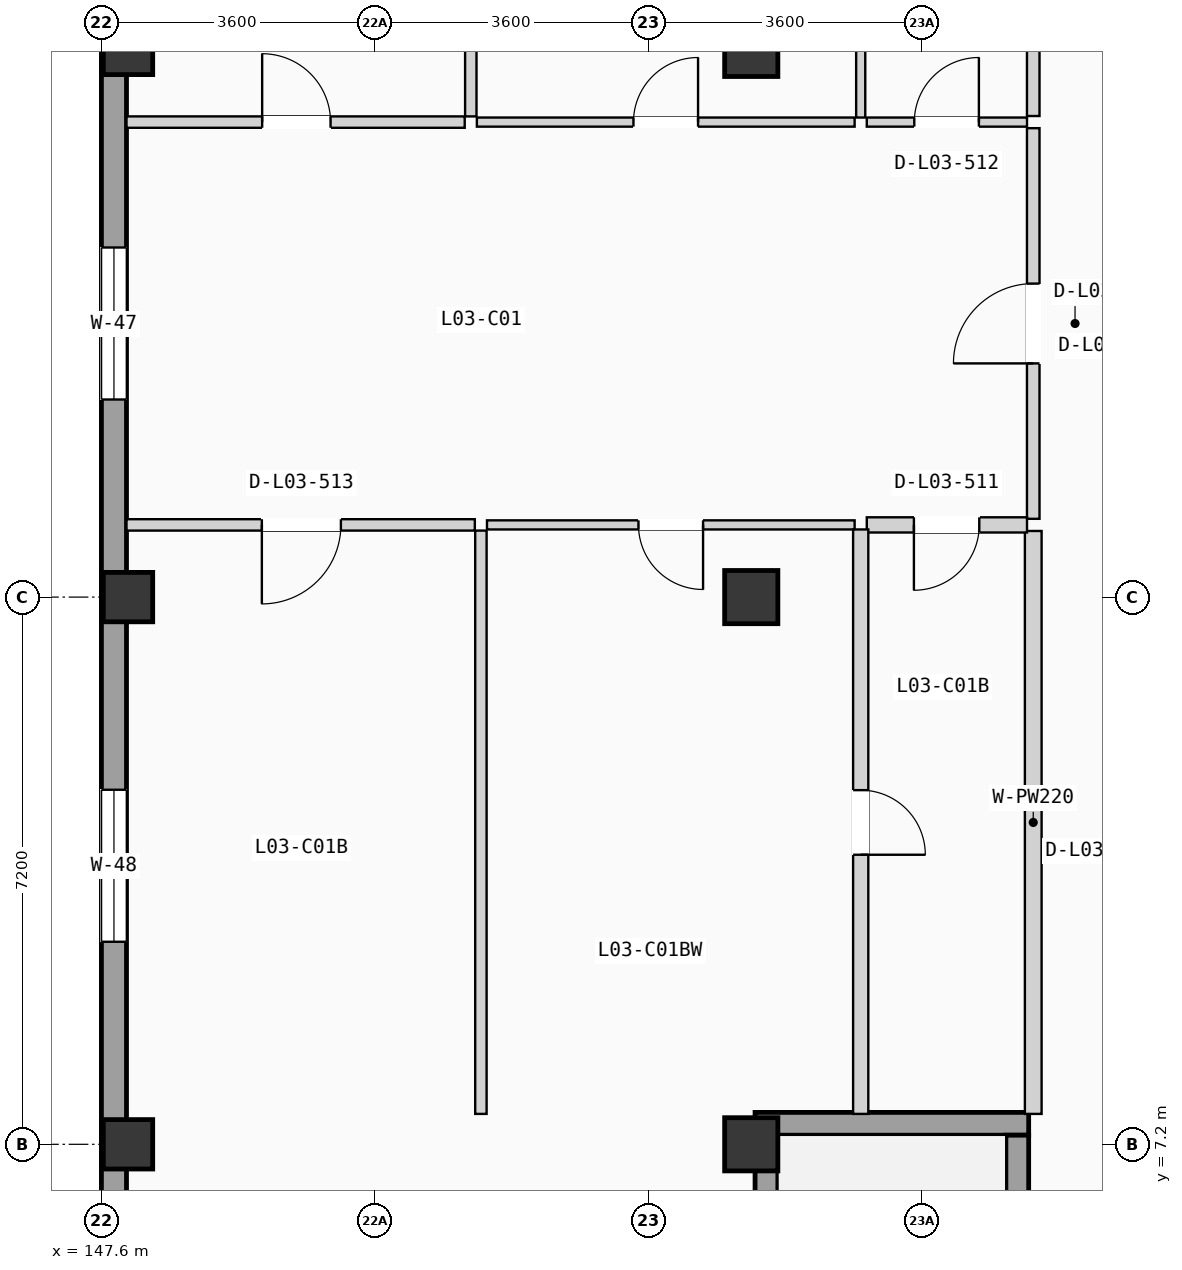
"""IFC4 building model, lengths in metres.
Left out: names, types, materials, properties, quantities, classifications, styles, units other than length and angle.
Written with IfcOpenShell. Run it as: python <this file> out.ifc"""

import sys

from ifc_helpers import new_model, si_unit, direction, frame, frame_2d, origin, origin_2d, place, context, subcontext, project, spatial, rectangle, extrude, element, fill, save


model = new_model("IFC4")
c1 = context("Model", 3, precision=1e-05, world=origin(), true_north=direction((0.0, 1.0)))
c2 = subcontext(c1, "Body", "Model", "MODEL_VIEW")
j1 = project(units=[si_unit("LENGTHUNIT", "METRE"), si_unit("PLANEANGLEUNIT", "RADIAN")], contexts=[c1])
p1 = place(None, origin())
s1 = spatial("IfcSite", under=j1, at=p1, CompositionType="ELEMENT")
p2 = place(p1, origin())
s2 = spatial("IfcBuilding", under=s1, at=p2, CompositionType="ELEMENT")
p3 = place(p2, frame((0.0, 0.0, 12.075)))
s3 = spatial("IfcBuildingStorey", under=s2, at=p3, CompositionType="ELEMENT", Elevation=12.075)
for number, where, z_axis, x_axis in (
    (1, (147.95, 7.2, 0.0), (0.0, 0.0, 1.0), (1.0, 0.0, 0.0)),
    (2, (147.95, 14.4, 0.0), (0.0, 0.0, 1.0), (1.0, 0.0, 0.0)),
    (3, (147.95, 21.6, 0.0), (0.0, 0.0, 1.0), (1.0, 0.0, 0.0)),
):
    element("IfcColumn", number, at=place(p3, frame(where, z_axis=z_axis, x_axis=x_axis)), inside=s3, PredefinedType="COLUMN", context=c2, shape_type="SweptSolid", body=[
        extrude(rectangle(XDim=0.65, YDim=0.65, at=origin_2d()), origin(), (0.0, 0.0, 1.0), 3.15),
    ])
for number, where, z_axis, x_axis in (
    (4, (156.15, 7.2, 0.0), (0.0, 0.0, 1.0), (1.0, 0.0, 0.0)),
    (5, (156.15, 14.4, 0.0), (0.0, 0.0, 1.0), (1.0, 0.0, 0.0)),
    (6, (156.15, 21.6, 0.0), (0.0, 0.0, 1.0), (1.0, 0.0, 0.0)),
):
    element("IfcColumn", number, at=place(p3, frame(where, z_axis=z_axis, x_axis=x_axis)), inside=s3, PredefinedType="COLUMN", context=c2, shape_type="SweptSolid", body=[
        extrude(rectangle(XDim=0.7, YDim=0.7, at=origin_2d()), origin(), (0.0, 0.0, 1.0), 3.15),
    ])
p4 = place(p3, frame((147.765, 0.33, 0.0), z_axis=(0.0, 0.0, 1.0), x_axis=(0.0, 1.0, 0.0)))
e7 = element("IfcWall", 7, at=p4, inside=s3, PredefinedType="SOLIDWALL", context=c2, shape_type="SweptSolid", body=[
    extrude(rectangle(XDim=49.74, YDim=0.33, at=frame_2d((24.87, 0.0))), origin(), (0.0, 0.0, 1.0), 2.89),
])
p5 = place(p4, frame((16.67, 0.0, 0.855)))
e8 = element("IfcOpeningElement", 8, at=p5, cuts=e7, PredefinedType="OPENING", context=c2, shape_type="SweptSolid", body=[
    extrude(rectangle(XDim=2.0, YDim=1.35, at=frame_2d((1.0, 0.675))), frame((0.0, 0.175, 0.0), z_axis=(0.0, -1.0, 0.0), x_axis=(1.0, 0.0, 0.0)), (0.0, 0.0, 1.0), 0.35),
])
p6 = place(p4, frame((9.535, 0.0, 0.705)))
e9 = element("IfcOpeningElement", 9, at=p6, cuts=e7, PredefinedType="OPENING", context=c2, shape_type="SweptSolid", body=[
    extrude(rectangle(XDim=2.0, YDim=1.5, at=frame_2d((1.0, 0.75))), frame((0.0, 0.175, 0.0), z_axis=(0.0, -1.0, 0.0), x_axis=(1.0, 0.0, 0.0)), (0.0, 0.0, 1.0), 0.35),
])
p7 = place(p4, frame((23.87, 0.0, 0.555)))
e10 = element("IfcOpeningElement", 10, at=p7, cuts=e7, PredefinedType="OPENING", context=c2, shape_type="SweptSolid", body=[
    extrude(rectangle(XDim=2.0, YDim=1.65, at=frame_2d((1.0, 0.825))), frame((0.0, 0.175, 0.0), z_axis=(0.0, -1.0, 0.0), x_axis=(1.0, 0.0, 0.0)), (0.0, 0.0, 1.0), 0.35),
])
p8 = place(p4, frame((33.673, 0.0, 0.85)))
e11 = element("IfcOpeningElement", 11, at=p8, cuts=e7, PredefinedType="OPENING", context=c2, shape_type="SweptSolid", body=[
    extrude(rectangle(XDim=0.95, YDim=1.2, at=frame_2d((0.475, 0.6))), frame((0.0, 0.175, 0.0), z_axis=(0.0, -1.0, 0.0), x_axis=(1.0, 0.0, 0.0)), (0.0, 0.0, 1.0), 0.35),
])
p9 = place(p4, frame((29.664, 0.0, 0.9)))
e12 = element("IfcOpeningElement", 12, at=p9, cuts=e7, PredefinedType="OPENING", context=c2, shape_type="SweptSolid", body=[
    extrude(rectangle(XDim=2.15, YDim=1.2, at=frame_2d((1.075, 0.6))), frame((0.0, 0.175, 0.0), z_axis=(0.0, -1.0, 0.0), x_axis=(1.0, 0.0, 0.0)), (0.0, 0.0, 1.0), 0.35),
])
p10 = place(p4, frame((39.266, 0.0, 0.855)))
e13 = element("IfcOpeningElement", 13, at=p10, cuts=e7, PredefinedType="OPENING", context=c2, shape_type="SweptSolid", body=[
    extrude(rectangle(XDim=2.15, YDim=1.35, at=frame_2d((1.075, 0.675))), frame((0.0, 0.175, 0.0), z_axis=(0.0, -1.0, 0.0), x_axis=(1.0, 0.0, 0.0)), (0.0, 0.0, 1.0), 0.35),
])
p11 = place(p3, frame((156.2, 7.47, 0.0), z_axis=(0.0, 0.0, 1.0), x_axis=(1.0, 0.0, 0.0)))
e14 = element("IfcWall", 14, at=p11, inside=s3, PredefinedType="SHEAR", context=c2, shape_type="SweptSolid", body=[
    extrude(rectangle(XDim=3.6, YDim=0.3, at=frame_2d((1.8, 0.0))), origin(), (0.0, 0.0, 1.0), 2.89),
])
p12 = place(p3, frame((156.35, 0.32, 0.0), z_axis=(0.0, 0.0, 1.0), x_axis=(0.0, 1.0, 0.0)))
e15 = element("IfcWall", 15, at=p12, inside=s3, PredefinedType="SHEAR", context=c2, shape_type="SweptSolid", body=[
    extrude(rectangle(XDim=7.0, YDim=0.3, at=frame_2d((3.5, 0.0))), origin(), (0.0, 0.0, 1.0), 2.89),
])
p13 = place(p3, frame((159.65, 0.32, 0.0), z_axis=(0.0, 0.0, 1.0), x_axis=(0.0, 1.0, 0.0)))
e16 = element("IfcWall", 16, at=p13, inside=s3, PredefinedType="SHEAR", context=c2, shape_type="SweptSolid", body=[
    extrude(rectangle(XDim=7.0, YDim=0.3, at=frame_2d((3.5, 0.0))), origin(), (0.0, 0.0, 1.0), 2.89),
])
p14 = place(p13, frame((0.225, 0.0, 0.0)))
e17 = element("IfcOpeningElement", 17, at=p14, cuts=e16, PredefinedType="OPENING", context=c2, shape_type="SweptSolid", body=[
    extrude(rectangle(XDim=1.15, YDim=2.12, at=frame_2d((0.575, 1.06))), frame((0.0, 0.16, 0.0), z_axis=(0.0, -1.0, 0.0), x_axis=(1.0, 0.0, 0.0)), (0.0, 0.0, 1.0), 0.32),
])
p15 = place(p3, frame((159.86, 15.43, 0.0), z_axis=(0.0, 0.0, 1.0), x_axis=(0.0, 1.0, 0.0)))
e18 = element("IfcWall", 18, at=p15, inside=s3, PredefinedType="PARTITIONING", context=c2, shape_type="SweptSolid", body=[
    extrude(rectangle(XDim=5.14, YDim=0.165, at=frame_2d((2.57, 0.0))), origin(), (0.0, 0.0, 1.0), 2.87),
])
p16 = place(p15, frame((2.045, 0.0, 0.0)))
e19 = element("IfcOpeningElement", 19, at=p16, cuts=e18, PredefinedType="OPENING", context=c2, shape_type="SweptSolid", body=[
    extrude(rectangle(XDim=1.05, YDim=2.13, at=frame_2d((0.525, 1.065))), frame((0.0, 0.093, 0.0), z_axis=(0.0, -1.0, 0.0), x_axis=(1.0, 0.0, 0.0)), (0.0, 0.0, 1.0), 0.185),
])
p17 = place(p3, frame((159.86, 7.6, 0.0), z_axis=(0.0, 0.0, 1.0), x_axis=(0.0, 1.0, 0.0)))
e20 = element("IfcWall", 20, at=p17, inside=s3, PredefinedType="PLUMBINGWALL", context=c2, shape_type="SweptSolid", body=[
    extrude(rectangle(XDim=7.67, YDim=0.22, at=frame_2d((3.835, 0.0))), origin(), (0.0, 0.0, 1.0), 2.87),
])
p18 = place(p3, frame((159.86, 20.73, 0.0), z_axis=(0.0, 0.0, 1.0), x_axis=(0.0, 1.0, 0.0)))
e21 = element("IfcWall", 21, at=p18, inside=s3, PredefinedType="PARTITIONING", context=c2, shape_type="SweptSolid", body=[
    extrude(rectangle(XDim=7.9, YDim=0.165, at=frame_2d((3.95, 0.0))), origin(), (0.0, 0.0, 1.0), 2.87),
])
p19 = place(p3, frame((157.67, 15.35, 0.0), z_axis=(0.0, 0.0, 1.0), x_axis=(1.0, 0.0, 0.0)))
e22 = element("IfcWall", 22, at=p19, inside=s3, PredefinedType="PLUMBINGWALL", context=c2, shape_type="SweptSolid", body=[
    extrude(rectangle(XDim=2.108, YDim=0.2, at=frame_2d((1.054, 0.0))), origin(), (0.0, 0.0, 1.0), 2.87),
])
p20 = place(p19, frame((0.62, 0.0, 0.0)))
e23 = element("IfcOpeningElement", 23, at=p20, cuts=e22, PredefinedType="OPENING", context=c2, shape_type="SweptSolid", body=[
    extrude(rectangle(XDim=0.86, YDim=2.0, at=frame_2d((0.43, 1.0))), frame((0.0, 0.11, 0.0), z_axis=(0.0, -1.0, 0.0), x_axis=(1.0, 0.0, 0.0)), (0.0, 0.0, 1.0), 0.22),
])
p21 = place(p3, frame((157.67, 20.65, 0.0), z_axis=(0.0, 0.0, 1.0), x_axis=(1.0, 0.0, 0.0)))
e24 = element("IfcWall", 24, at=p21, inside=s3, PredefinedType="PARTITIONING", context=c2, shape_type="SweptSolid", body=[
    extrude(rectangle(XDim=2.108, YDim=0.12, at=frame_2d((1.054, 0.0))), origin(), (0.0, 0.0, 1.0), 2.87),
])
p22 = place(p21, frame((0.625, 0.0, 0.0)))
e25 = element("IfcOpeningElement", 25, at=p22, cuts=e24, PredefinedType="OPENING", context=c2, shape_type="SweptSolid", body=[
    extrude(rectangle(XDim=0.85, YDim=2.01, at=frame_2d((0.425, 1.005))), frame((0.0, 0.07, 0.0), z_axis=(0.0, -1.0, 0.0), x_axis=(1.0, 0.0, 0.0)), (0.0, 0.0, 1.0), 0.14),
])
p23 = place(p3, frame((147.93, 15.35, 0.0), z_axis=(0.0, 0.0, 1.0), x_axis=(1.0, 0.0, 0.0)))
e26 = element("IfcWall", 26, at=p23, inside=s3, PredefinedType="PARTITIONING", context=c2, shape_type="SweptSolid", body=[
    extrude(rectangle(XDim=4.583, YDim=0.15, at=frame_2d((2.292, 0.0))), origin(), (0.0, 0.0, 1.0), 2.87),
])
p24 = place(p23, frame((1.781, 0.0, 0.0)))
e27 = element("IfcOpeningElement", 27, at=p24, cuts=e26, PredefinedType="OPENING", context=c2, shape_type="SweptSolid", body=[
    extrude(rectangle(XDim=1.04, YDim=2.08, at=frame_2d((0.52, 1.04))), frame((0.0, 0.085, 0.0), z_axis=(0.0, -1.0, 0.0), x_axis=(1.0, 0.0, 0.0)), (0.0, 0.0, 1.0), 0.17),
])
p25 = place(p3, frame((152.673, 15.35, 0.0), z_axis=(0.0, 0.0, 1.0), x_axis=(1.0, 0.0, 0.0)))
e28 = element("IfcWall", 28, at=p25, inside=s3, PredefinedType="PARTITIONING", context=c2, shape_type="SweptSolid", body=[
    extrude(rectangle(XDim=4.837, YDim=0.12, at=frame_2d((2.418, 0.0))), origin(), (0.0, 0.0, 1.0), 2.87),
])
p26 = place(p25, frame((1.993, 0.0, 0.0)))
e29 = element("IfcOpeningElement", 29, at=p26, cuts=e28, PredefinedType="OPENING", context=c2, shape_type="SweptSolid", body=[
    extrude(rectangle(XDim=0.85, YDim=2.01, at=frame_2d((0.425, 1.005))), frame((0.0, 0.07, 0.0), z_axis=(0.0, -1.0, 0.0), x_axis=(1.0, 0.0, 0.0)), (0.0, 0.0, 1.0), 0.14),
])
p27 = place(p3, frame((147.93, 20.65, 0.0), z_axis=(0.0, 0.0, 1.0), x_axis=(1.0, 0.0, 0.0)))
e30 = element("IfcWall", 30, at=p27, inside=s3, PredefinedType="PARTITIONING", context=c2, shape_type="SweptSolid", body=[
    extrude(rectangle(XDim=4.45, YDim=0.15, at=frame_2d((2.225, 0.0))), origin(), (0.0, 0.0, 1.0), 2.87),
])
p28 = place(p27, frame((1.785, 0.0, 0.0)))
e31 = element("IfcOpeningElement", 31, at=p28, cuts=e30, PredefinedType="OPENING", context=c2, shape_type="SweptSolid", body=[
    extrude(rectangle(XDim=0.9, YDim=2.04, at=frame_2d((0.45, 1.02))), frame((0.0, 0.085, 0.0), z_axis=(0.0, -1.0, 0.0), x_axis=(1.0, 0.0, 0.0)), (0.0, 0.0, 1.0), 0.17),
])
p29 = place(p3, frame((152.54, 20.65, 0.0), z_axis=(0.0, 0.0, 1.0), x_axis=(1.0, 0.0, 0.0)))
e32 = element("IfcWall", 32, at=p29, inside=s3, PredefinedType="PARTITIONING", context=c2, shape_type="SweptSolid", body=[
    extrude(rectangle(XDim=4.97, YDim=0.12, at=frame_2d((2.485, 0.0))), origin(), (0.0, 0.0, 1.0), 2.87),
])
p30 = place(p29, frame((2.06, 0.0, 0.0)))
e33 = element("IfcOpeningElement", 33, at=p30, cuts=e32, PredefinedType="OPENING", context=c2, shape_type="SweptSolid", body=[
    extrude(rectangle(XDim=0.85, YDim=2.01, at=frame_2d((0.425, 1.005))), frame((0.0, 0.07, 0.0), z_axis=(0.0, -1.0, 0.0), x_axis=(1.0, 0.0, 0.0)), (0.0, 0.0, 1.0), 0.14),
])
p31 = place(p3, frame((157.59, 7.6, 0.0), z_axis=(0.0, 0.0, 1.0), x_axis=(0.0, 1.0, 0.0)))
e34 = element("IfcWall", 34, at=p31, inside=s3, PredefinedType="PLUMBINGWALL", context=c2, shape_type="SweptSolid", body=[
    extrude(rectangle(XDim=7.69, YDim=0.2, at=frame_2d((3.845, 0.0))), origin(), (0.0, 0.0, 1.0), 2.87),
])
p32 = place(p31, frame((3.41, 0.0, 0.0)))
e35 = element("IfcOpeningElement", 35, at=p32, cuts=e34, PredefinedType="OPENING", context=c2, shape_type="SweptSolid", body=[
    extrude(rectangle(XDim=0.85, YDim=2.01, at=frame_2d((0.425, 1.005))), frame((0.0, 0.11, 0.0), z_axis=(0.0, -1.0, 0.0), x_axis=(1.0, 0.0, 0.0)), (0.0, 0.0, 1.0), 0.22),
])
p33 = place(p3, frame((157.59, 20.71, 0.0), z_axis=(0.0, 0.0, 1.0), x_axis=(0.0, 1.0, 0.0)))
e36 = element("IfcWall", 36, at=p33, inside=s3, PredefinedType="PARTITIONING", context=c2, shape_type="SweptSolid", body=[
    extrude(rectangle(XDim=7.92, YDim=0.12, at=frame_2d((3.96, 0.0))), origin(), (0.0, 0.0, 1.0), 2.87),
])
p34 = place(p3, frame((152.593, 7.6, 0.0), z_axis=(0.0, 0.0, 1.0), x_axis=(0.0, 1.0, 0.0)))
e37 = element("IfcWall", 37, at=p34, inside=s3, PredefinedType="PARTITIONING", context=c2, shape_type="SweptSolid", body=[
    extrude(rectangle(XDim=7.675, YDim=0.15, at=frame_2d((3.837, 0.0))), origin(), (0.0, 0.0, 1.0), 2.87),
])
p35 = place(p3, frame((152.46, 20.725, 0.0), z_axis=(0.0, 0.0, 1.0), x_axis=(0.0, 1.0, 0.0)))
e38 = element("IfcWall", 38, at=p35, inside=s3, PredefinedType="PARTITIONING", context=c2, shape_type="SweptSolid", body=[
    extrude(rectangle(XDim=7.905, YDim=0.15, at=frame_2d((3.952, 0.0))), origin(), (0.0, 0.0, 1.0), 2.87),
])
p36 = place(p5, origin())
e39 = element("IfcWindow", 39, at=p36, inside=s3, PartitioningType="DOUBLE_PANEL_VERTICAL", PredefinedType="WINDOW", context=c2, shape_type="SweptSolid", body=[
    extrude(rectangle(XDim=2.0, YDim=1.35, at=frame_2d((1.0, 0.675))), frame((0.0, 0.03, 0.0), z_axis=(0.0, -1.0, 0.0), x_axis=(1.0, 0.0, 0.0)), (0.0, 0.0, 1.0), 0.06),
])
fill(e8, e39)
p37 = place(p6, origin())
e40 = element("IfcWindow", 40, at=p37, inside=s3, PartitioningType="DOUBLE_PANEL_VERTICAL", PredefinedType="WINDOW", context=c2, shape_type="SweptSolid", body=[
    extrude(rectangle(XDim=2.0, YDim=1.5, at=frame_2d((1.0, 0.75))), frame((0.0, 0.03, 0.0), z_axis=(0.0, -1.0, 0.0), x_axis=(1.0, 0.0, 0.0)), (0.0, 0.0, 1.0), 0.06),
])
fill(e9, e40)
p38 = place(p16, origin())
e41 = element("IfcDoor", 41, at=p38, inside=s3, OperationType="SINGLE_SWING_LEFT", PredefinedType="DOOR", context=c2, shape_type="SweptSolid", body=[
    extrude(rectangle(XDim=1.05, YDim=2.13, at=frame_2d((0.525, 1.065))), frame((0.0, 0.025, 0.0), z_axis=(0.0, -1.0, 0.0), x_axis=(1.0, 0.0, 0.0)), (0.0, 0.0, 1.0), 0.05),
])
fill(e19, e41)
p39 = place(p20, frame((0.86, 0.0, 0.0), z_axis=(0.0, 0.0, 1.0), x_axis=(-1.0, 0.0, 0.0)))
e42 = element("IfcDoor", 42, at=p39, inside=s3, OperationType="SINGLE_SWING_LEFT", PredefinedType="DOOR", context=c2, shape_type="SweptSolid", body=[
    extrude(rectangle(XDim=0.86, YDim=2.0, at=frame_2d((0.43, 1.0))), frame((0.0, 0.025, 0.0), z_axis=(0.0, -1.0, 0.0), x_axis=(1.0, 0.0, 0.0)), (0.0, 0.0, 1.0), 0.05),
])
fill(e23, e42)
p40 = place(p22, origin())
e43 = element("IfcDoor", 43, at=p40, inside=s3, OperationType="SINGLE_SWING_RIGHT", PredefinedType="DOOR", context=c2, shape_type="SweptSolid", body=[
    extrude(rectangle(XDim=0.85, YDim=2.01, at=frame_2d((0.425, 1.005))), frame((0.0, 0.025, 0.0), z_axis=(0.0, -1.0, 0.0), x_axis=(1.0, 0.0, 0.0)), (0.0, 0.0, 1.0), 0.05),
])
fill(e25, e43)
p41 = place(p24, frame((1.04, 0.0, 0.0), z_axis=(0.0, 0.0, 1.0), x_axis=(-1.0, 0.0, 0.0)))
e44 = element("IfcDoor", 44, at=p41, inside=s3, OperationType="SINGLE_SWING_LEFT", PredefinedType="DOOR", context=c2, shape_type="SweptSolid", body=[
    extrude(rectangle(XDim=1.04, YDim=2.08, at=frame_2d((0.52, 1.04))), frame((0.0, 0.025, 0.0), z_axis=(0.0, -1.0, 0.0), x_axis=(1.0, 0.0, 0.0)), (0.0, 0.0, 1.0), 0.05),
])
fill(e27, e44)
p42 = place(p26, frame((0.85, 0.0, 0.0), z_axis=(0.0, 0.0, 1.0), x_axis=(-1.0, 0.0, 0.0)))
e45 = element("IfcDoor", 45, at=p42, inside=s3, OperationType="SINGLE_SWING_RIGHT", PredefinedType="DOOR", context=c2, shape_type="SweptSolid", body=[
    extrude(rectangle(XDim=0.85, YDim=2.01, at=frame_2d((0.425, 1.005))), frame((0.0, 0.025, 0.0), z_axis=(0.0, -1.0, 0.0), x_axis=(1.0, 0.0, 0.0)), (0.0, 0.0, 1.0), 0.05),
])
fill(e29, e45)
p43 = place(p28, origin())
e46 = element("IfcDoor", 46, at=p43, inside=s3, OperationType="SINGLE_SWING_LEFT", PredefinedType="DOOR", context=c2, shape_type="SweptSolid", body=[
    extrude(rectangle(XDim=0.9, YDim=2.04, at=frame_2d((0.45, 1.02))), frame((0.0, 0.025, 0.0), z_axis=(0.0, -1.0, 0.0), x_axis=(1.0, 0.0, 0.0)), (0.0, 0.0, 1.0), 0.05),
])
fill(e31, e46)
p44 = place(p30, origin())
e47 = element("IfcDoor", 47, at=p44, inside=s3, OperationType="SINGLE_SWING_RIGHT", PredefinedType="DOOR", context=c2, shape_type="SweptSolid", body=[
    extrude(rectangle(XDim=0.85, YDim=2.01, at=frame_2d((0.425, 1.005))), frame((0.0, 0.025, 0.0), z_axis=(0.0, -1.0, 0.0), x_axis=(1.0, 0.0, 0.0)), (0.0, 0.0, 1.0), 0.05),
])
fill(e33, e47)
p45 = place(p32, frame((0.85, 0.0, 0.0), z_axis=(0.0, 0.0, 1.0), x_axis=(-1.0, 0.0, 0.0)))
e48 = element("IfcDoor", 48, at=p45, inside=s3, OperationType="SINGLE_SWING_LEFT", PredefinedType="DOOR", context=c2, shape_type="SweptSolid", body=[
    extrude(rectangle(XDim=0.85, YDim=2.01, at=frame_2d((0.425, 1.005))), frame((0.0, 0.025, 0.0), z_axis=(0.0, -1.0, 0.0), x_axis=(1.0, 0.0, 0.0)), (0.0, 0.0, 1.0), 0.05),
])
fill(e35, e48)
save(model, sys.argv[1])
